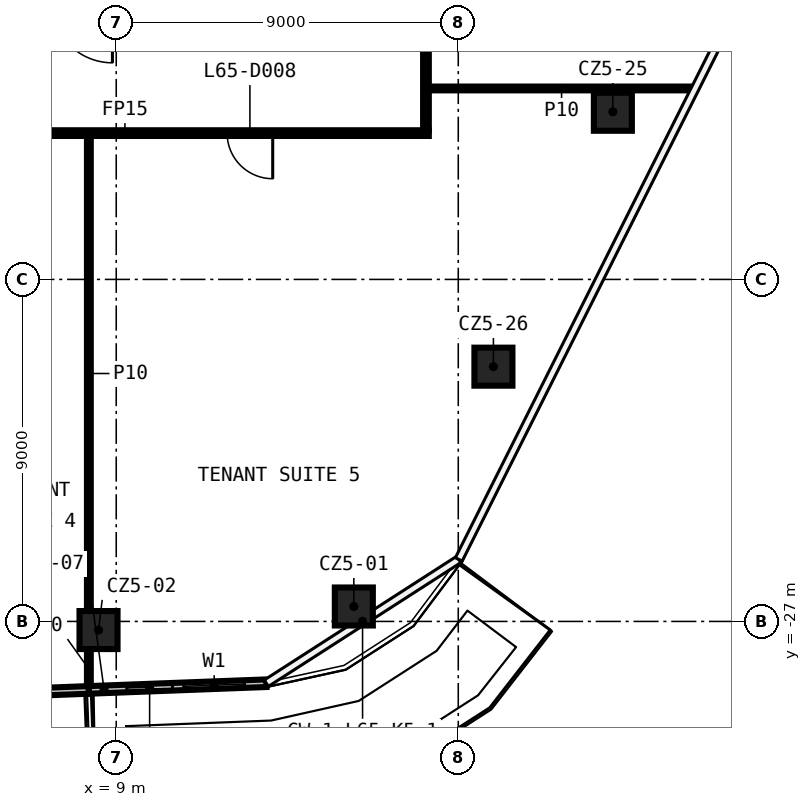
"""IFC4 building model, lengths in metres.
Left out: names, types, materials, properties, quantities, classifications, styles, units other than length and angle.
Written with IfcOpenShell. Run it as: python <this file> out.ifc"""

import sys

from ifc_helpers import new_model, si_unit, direction, frame, frame_2d, origin, origin_2d, place, context, subcontext, project, spatial, rectangle, extrude, element, fill, save


model = new_model("IFC4")
c1 = context("Model", 3, precision=1e-05, world=origin(), true_north=direction((0.0, 1.0)))
c2 = subcontext(c1, "Body", "Model", "MODEL_VIEW")
j1 = project(units=[si_unit("LENGTHUNIT", "METRE"), si_unit("PLANEANGLEUNIT", "RADIAN")], contexts=[c1])
p1 = place(None, origin())
s1 = spatial("IfcSite", under=j1, at=p1, CompositionType="ELEMENT")
p2 = place(p1, origin())
s2 = spatial("IfcBuilding", under=s1, at=p2, CompositionType="ELEMENT")
p3 = place(p2, frame((0.0, 0.0, 306.8)))
s3 = spatial("IfcBuildingStorey", under=s2, at=p3, CompositionType="ELEMENT", Elevation=306.8)
for number, where, z_axis, x_axis in (
    (1, (15.252, -26.607, 0.0), (0.0, 0.0, 1.0), (1.0, 0.0, 0.0)),
    (2, (8.534, -27.227, 0.0), (0.0, 0.0, 1.0), (1.0, 0.0, 0.0)),
    (3, (22.068, -13.588, 0.0), (0.0, 0.0, 1.0), (1.0, 0.0, 0.0)),
    (4, (18.925, -20.296, 0.0), (0.0, 0.0, 1.0), (1.0, 0.0, 0.0)),
):
    element("IfcColumn", number, at=place(p3, frame(where, z_axis=z_axis, x_axis=x_axis)), inside=s3, PredefinedType="COLUMN", context=c2, shape_type="SweptSolid", body=[
        extrude(rectangle(XDim=1.0, YDim=1.0, at=origin_2d()), origin(), (0.0, 0.0, 1.0), 3.82),
    ])
p4 = place(p3, frame((17.225, -14.15, 0.0), z_axis=(0.0, 0.0, 1.0), x_axis=(-1.0, 0.0, 0.0)))
e5 = element("IfcWall", 5, at=p4, inside=s3, PredefinedType="PARTITIONING", context=c2, shape_type="SweptSolid", body=[
    extrude(rectangle(XDim=34.45, YDim=0.15, at=frame_2d((17.225, 0.0))), origin(), (0.0, 0.0, 1.0), 3.82),
])
p5 = place(p4, frame((31.269, 0.0, 0.0)))
e6 = element("IfcOpeningElement", 6, at=p5, cuts=e5, PredefinedType="OPENING", context=c2, shape_type="SweptSolid", body=[
    extrude(rectangle(XDim=1.2, YDim=2.1, at=frame_2d((0.6, 1.05))), frame((0.0, 0.085, 0.0), z_axis=(0.0, -1.0, 0.0), x_axis=(1.0, 0.0, 0.0)), (0.0, 0.0, 1.0), 0.17),
])
p6 = place(p4, frame((24.719, 0.0, 0.0)))
e7 = element("IfcOpeningElement", 7, at=p6, cuts=e5, PredefinedType="OPENING", context=c2, shape_type="SweptSolid", body=[
    extrude(rectangle(XDim=1.2, YDim=2.1, at=frame_2d((0.6, 1.05))), frame((0.0, 0.085, 0.0), z_axis=(0.0, -1.0, 0.0), x_axis=(1.0, 0.0, 0.0)), (0.0, 0.0, 1.0), 0.17),
])
p7 = place(p4, frame((20.044, 0.0, 0.0)))
e8 = element("IfcOpeningElement", 8, at=p7, cuts=e5, PredefinedType="OPENING", context=c2, shape_type="SweptSolid", body=[
    extrude(rectangle(XDim=1.2, YDim=2.1, at=frame_2d((0.6, 1.05))), frame((0.0, 0.085, 0.0), z_axis=(0.0, -1.0, 0.0), x_axis=(1.0, 0.0, 0.0)), (0.0, 0.0, 1.0), 0.17),
])
p8 = place(p4, frame((15.364, 0.0, 0.0)))
e9 = element("IfcOpeningElement", 9, at=p8, cuts=e5, PredefinedType="OPENING", context=c2, shape_type="SweptSolid", body=[
    extrude(rectangle(XDim=1.2, YDim=2.1, at=frame_2d((0.6, 1.05))), frame((0.0, 0.085, 0.0), z_axis=(0.0, -1.0, 0.0), x_axis=(1.0, 0.0, 0.0)), (0.0, 0.0, 1.0), 0.17),
])
p9 = place(p4, frame((10.685, 0.0, 0.0)))
e10 = element("IfcOpeningElement", 10, at=p9, cuts=e5, PredefinedType="OPENING", context=c2, shape_type="SweptSolid", body=[
    extrude(rectangle(XDim=1.2, YDim=2.1, at=frame_2d((0.6, 1.05))), frame((0.0, 0.085, 0.0), z_axis=(0.0, -1.0, 0.0), x_axis=(1.0, 0.0, 0.0)), (0.0, 0.0, 1.0), 0.17),
])
p10 = place(p4, frame((4.107, 0.0, 0.0)))
e11 = element("IfcOpeningElement", 11, at=p10, cuts=e5, PredefinedType="OPENING", context=c2, shape_type="SweptSolid", body=[
    extrude(rectangle(XDim=1.2, YDim=2.1, at=frame_2d((0.6, 1.05))), frame((0.0, 0.085, 0.0), z_axis=(0.0, -1.0, 0.0), x_axis=(1.0, 0.0, 0.0)), (0.0, 0.0, 1.0), 0.17),
])
p11 = place(p3, frame((17.225, -12.975, 0.0), z_axis=(0.0, 0.0, 1.0), x_axis=(1.0, 0.0, 0.0)))
e12 = element("IfcWall", 12, at=p11, inside=s3, PredefinedType="PARTITIONING", context=c2, shape_type="SweptSolid", body=[
    extrude(rectangle(XDim=6.987, YDim=0.1, at=frame_2d((3.493, 0.0))), origin(), (0.0, 0.0, 1.0), 3.82),
])
p12 = place(p3, frame((17.15, 14.075, 0.0), z_axis=(0.0, 0.0, 1.0), x_axis=(0.0, -1.0, 0.0)))
e13 = element("IfcWall", 13, at=p12, inside=s3, PredefinedType="PARTITIONING", context=c2, shape_type="SweptSolid", body=[
    extrude(rectangle(XDim=28.15, YDim=0.15, at=frame_2d((14.075, 0.0))), origin(), (0.0, 0.0, 1.0), 3.82),
])
p13 = place(p12, frame((18.182, 0.0, 0.0)))
e14 = element("IfcOpeningElement", 14, at=p13, cuts=e13, PredefinedType="OPENING", context=c2, shape_type="SweptSolid", body=[
    extrude(rectangle(XDim=1.2, YDim=2.1, at=frame_2d((0.6, 1.05))), frame((0.0, 0.085, 0.0), z_axis=(0.0, -1.0, 0.0), x_axis=(1.0, 0.0, 0.0)), (0.0, 0.0, 1.0), 0.17),
])
p14 = place(p12, frame((10.811, 0.0, 0.0)))
e15 = element("IfcOpeningElement", 15, at=p14, cuts=e13, PredefinedType="OPENING", context=c2, shape_type="SweptSolid", body=[
    extrude(rectangle(XDim=1.2, YDim=2.1, at=frame_2d((0.6, 1.05))), frame((0.0, 0.085, 0.0), z_axis=(0.0, -1.0, 0.0), x_axis=(1.0, 0.0, 0.0)), (0.0, 0.0, 1.0), 0.17),
])
p15 = place(p12, frame((3.647, 0.0, 0.0)))
e16 = element("IfcOpeningElement", 16, at=p15, cuts=e13, PredefinedType="OPENING", context=c2, shape_type="SweptSolid", body=[
    extrude(rectangle(XDim=1.2, YDim=2.1, at=frame_2d((0.6, 1.05))), frame((0.0, 0.085, 0.0), z_axis=(0.0, -1.0, 0.0), x_axis=(1.0, 0.0, 0.0)), (0.0, 0.0, 1.0), 0.17),
])
p16 = place(p3, frame((8.28, -28.782, 0.0), z_axis=(0.0, 0.0, 1.0), x_axis=(0.0, 1.0, 0.0)))
e17 = element("IfcWall", 17, at=p16, inside=s3, PredefinedType="PARTITIONING", context=c2, shape_type="SweptSolid", body=[
    extrude(rectangle(XDim=1.055, YDim=0.1, at=frame_2d((0.528, 0.0))), origin(), (0.0, 0.0, 1.0), 3.82),
])
p17 = place(p3, frame((8.28, -26.727, 0.0), z_axis=(0.0, 0.0, 1.0), x_axis=(0.0, 1.0, 0.0)))
e18 = element("IfcWall", 18, at=p17, inside=s3, PredefinedType="PARTITIONING", context=c2, shape_type="SweptSolid", body=[
    extrude(rectangle(XDim=12.502, YDim=0.1, at=frame_2d((6.251, 0.0))), origin(), (0.0, 0.0, 1.0), 3.82),
])
p18 = place(p3, frame((-1.079, -29.156, 0.0), z_axis=(0.0, 0.0, 1.0), x_axis=(0.999288261827, 0.037722271597, 0.0)))
e19 = element("IfcWall", 19, at=p18, inside=s3, PredefinedType="SOLIDWALL", context=c2, shape_type="SweptSolid", body=[
    extrude(rectangle(XDim=9.365, YDim=0.2, at=frame_2d((4.683, 0.0))), origin(), (0.0, 0.0, 1.0), 3.82),
])
p19 = place(p18, frame((2.0, 0.0, 0.6)))
e20 = element("IfcOpeningElement", 20, at=p19, cuts=e19, PredefinedType="OPENING", context=c2, shape_type="SweptSolid", body=[
    extrude(rectangle(XDim=1.6, YDim=2.4, at=frame_2d((0.8, 1.2))), frame((0.0, 0.11, 0.0), z_axis=(0.0, -1.0, 0.0), x_axis=(1.0, 0.0, 0.0)), (0.0, 0.0, 1.0), 0.22),
])
p20 = place(p18, frame((0.5, 0.0, 0.0)))
e21 = element("IfcOpeningElement", 21, at=p20, cuts=e19, PredefinedType="OPENING", context=c2, shape_type="SweptSolid", body=[
    extrude(rectangle(XDim=1.2, YDim=2.4, at=frame_2d((0.6, 1.2))), frame((0.0, 0.11, 0.0), z_axis=(0.0, -1.0, 0.0), x_axis=(1.0, 0.0, 0.0)), (0.0, 0.0, 1.0), 0.22),
])
p21 = place(p18, frame((6.683, 0.0, 0.6)))
e22 = element("IfcOpeningElement", 22, at=p21, cuts=e19, PredefinedType="OPENING", context=c2, shape_type="SweptSolid", body=[
    extrude(rectangle(XDim=1.6, YDim=2.4, at=frame_2d((0.8, 1.2))), frame((0.0, 0.11, 0.0), z_axis=(0.0, -1.0, 0.0), x_axis=(1.0, 0.0, 0.0)), (0.0, 0.0, 1.0), 0.22),
])
p22 = place(p18, frame((5.183, 0.0, 0.0)))
e23 = element("IfcOpeningElement", 23, at=p22, cuts=e19, PredefinedType="OPENING", context=c2, shape_type="SweptSolid", body=[
    extrude(rectangle(XDim=1.2, YDim=2.4, at=frame_2d((0.6, 1.2))), frame((0.0, 0.11, 0.0), z_axis=(0.0, -1.0, 0.0), x_axis=(1.0, 0.0, 0.0)), (0.0, 0.0, 1.0), 0.22),
])
p23 = place(p3, frame((8.28, -28.802, 0.0), z_axis=(0.0, 0.0, 1.0), x_axis=(0.999288539502, 0.037714915082, 0.0)))
e24 = element("IfcWall", 24, at=p23, inside=s3, PredefinedType="SOLIDWALL", context=c2, shape_type="SweptSolid", body=[
    extrude(rectangle(XDim=4.674, YDim=0.2, at=frame_2d((2.337, 0.0))), origin(), (0.0, 0.0, 1.0), 3.82),
])
p24 = place(p23, frame((2.5, 0.0, 0.6)))
e25 = element("IfcOpeningElement", 25, at=p24, cuts=e24, PredefinedType="OPENING", context=c2, shape_type="SweptSolid", body=[
    extrude(rectangle(XDim=1.6, YDim=2.4, at=frame_2d((0.8, 1.2))), frame((0.0, 0.11, 0.0), z_axis=(0.0, -1.0, 0.0), x_axis=(1.0, 0.0, 0.0)), (0.0, 0.0, 1.0), 0.22),
])
p25 = place(p23, frame((1.0, 0.0, 0.0)))
e26 = element("IfcOpeningElement", 26, at=p25, cuts=e24, PredefinedType="OPENING", context=c2, shape_type="SweptSolid", body=[
    extrude(rectangle(XDim=1.2, YDim=2.4, at=frame_2d((0.6, 1.2))), frame((0.0, 0.11, 0.0), z_axis=(0.0, -1.0, 0.0), x_axis=(1.0, 0.0, 0.0)), (0.0, 0.0, 1.0), 0.22),
])
p26 = place(p10, origin())
e27 = element("IfcDoor", 27, at=p26, inside=s3, OperationType="SINGLE_SWING_LEFT", PredefinedType="DOOR", context=c2, shape_type="SweptSolid", body=[
    extrude(rectangle(XDim=1.2, YDim=2.1, at=frame_2d((0.6, 1.05))), frame((0.0, 0.025, 0.0), z_axis=(0.0, -1.0, 0.0), x_axis=(1.0, 0.0, 0.0)), (0.0, 0.0, 1.0), 0.05),
])
fill(e11, e27)
p27 = place(p24, origin())
e28 = element("IfcWindow", 28, at=p27, inside=s3, PartitioningType="SINGLE_PANEL", PredefinedType="WINDOW", context=c2, shape_type="SweptSolid", body=[
    extrude(rectangle(XDim=1.6, YDim=2.4, at=frame_2d((0.8, 1.2))), frame((0.0, 0.03, 0.0), z_axis=(0.0, -1.0, 0.0), x_axis=(1.0, 0.0, 0.0)), (0.0, 0.0, 1.0), 0.06),
])
fill(e25, e28)
p28 = place(p25, origin())
e29 = element("IfcDoor", 29, at=p28, inside=s3, OperationType="SLIDING_TO_LEFT", PredefinedType="DOOR", context=c2, shape_type="SweptSolid", body=[
    extrude(rectangle(XDim=1.2, YDim=2.4, at=frame_2d((0.6, 1.2))), frame((0.0, 0.025, 0.0), z_axis=(0.0, -1.0, 0.0), x_axis=(1.0, 0.0, 0.0)), (0.0, 0.0, 1.0), 0.05),
])
fill(e26, e29)
save(model, sys.argv[1])
